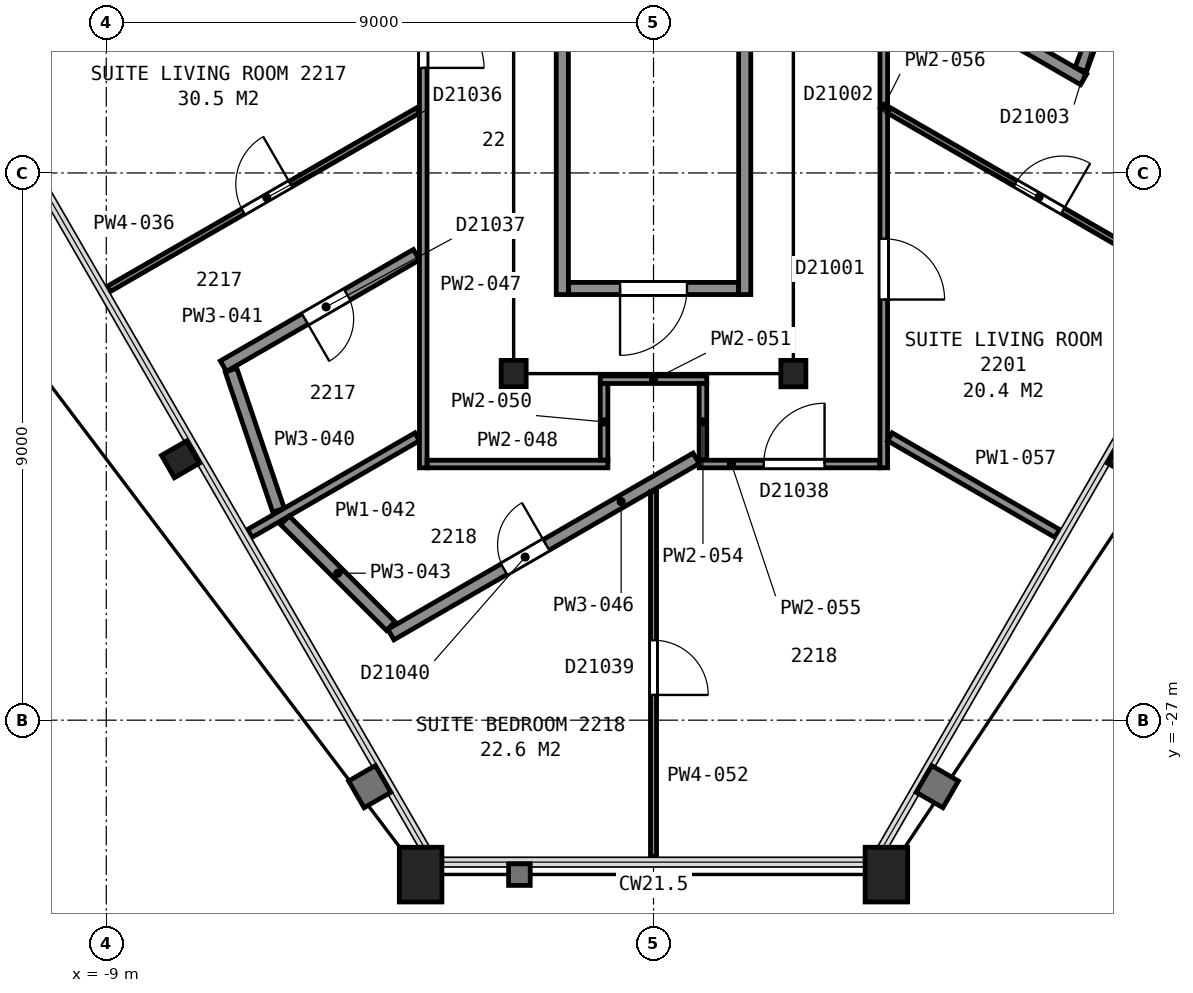
"""IFC4 building model, lengths in metres.
Left out: names, types, materials, properties, quantities, classifications, styles, units other than length and angle.
Written with IfcOpenShell. Run it as: python <this file> out.ifc"""

import sys

from ifc_helpers import new_model, si_unit, direction, frame, frame_2d, origin, origin_2d, place, context, subcontext, project, spatial, rectangle, hollow_rectangle, i_section, extrude, element, fill, save


model = new_model("IFC4")
c1 = context("Model", 3, precision=1e-05, world=origin(), true_north=direction((0.0, 1.0)))
c2 = subcontext(c1, "Body", "Model", "MODEL_VIEW")
j1 = project(units=[si_unit("LENGTHUNIT", "METRE"), si_unit("PLANEANGLEUNIT", "RADIAN")], contexts=[c1])
p1 = place(None, origin())
s1 = spatial("IfcSite", under=j1, at=p1, CompositionType="ELEMENT")
p2 = place(p1, origin())
s2 = spatial("IfcBuilding", under=s1, at=p2, CompositionType="ELEMENT")
p3 = place(p2, frame((0.0, 0.0, 96.4)))
s3 = spatial("IfcBuildingStorey", under=s2, at=p3, CompositionType="ELEMENT", Elevation=96.4)
p4 = place(p3, frame((-7.78, -22.71, 0.0), z_axis=(0.0, 0.0, 1.0), x_axis=(-0.5, 0.866025403784, 0.0)))
e1 = element("IfcColumn", 1, at=p4, inside=s3, PredefinedType="COLUMN", context=c2, shape_type="SweptSolid", body=[
    extrude(i_section(OverallWidth=0.424, OverallDepth=0.475, WebThickness=0.048, FlangeThickness=0.077, FilletRadius=0.015, at=origin_2d()), origin(), (0.0, 0.0, 1.0), 3.555),
])
for number, where, z_axis, x_axis in (
    (2, (-3.83, -29.54, 0.0), (0.0, 0.0, 1.0), (-1.0, 0.0, 0.0)),
    (3, (3.83, -29.54, 0.0), (0.0, 0.0, 1.0), (-1.0, 0.0, 0.0)),
):
    element("IfcColumn", number, at=place(p3, frame(where, z_axis=z_axis, x_axis=x_axis)), inside=s3, PredefinedType="COLUMN", context=c2, shape_type="SweptSolid", body=[
        extrude(hollow_rectangle(XDim=0.7, YDim=0.9, WallThickness=0.065, at=origin_2d()), origin(), (0.0, 0.0, 1.0), 3.525),
    ])
p5 = place(p3, frame((7.78, -22.71, 0.0), z_axis=(0.0, 0.0, 1.0), x_axis=(-0.5, -0.866025403784, 0.0)))
e4 = element("IfcColumn", 4, at=p5, inside=s3, PredefinedType="COLUMN", context=c2, shape_type="SweptSolid", body=[
    extrude(i_section(OverallWidth=0.424, OverallDepth=0.475, WebThickness=0.048, FlangeThickness=0.077, FilletRadius=0.015, at=origin_2d()), origin(), (0.0, 0.0, 1.0), 3.555),
])
for number, where, z_axis, x_axis in (
    (5, (-2.3, -21.3, 0.0), (0.0, 0.0, 1.0), (-1.0, 0.0, 0.0)),
    (6, (2.3, -21.3, 0.0), (0.0, 0.0, 1.0), (-1.0, 0.0, 0.0)),
):
    element("IfcColumn", number, at=place(p3, frame(where, z_axis=z_axis, x_axis=x_axis)), inside=s3, PredefinedType="COLUMN", context=c2, shape_type="SweptSolid", body=[
        extrude(i_section(OverallWidth=0.411, OverallDepth=0.434, WebThickness=0.036, FlangeThickness=0.057, FilletRadius=0.015, at=origin_2d()), origin(), (0.0, 0.0, 1.0), 3.6),
    ])
p6 = place(p3, frame((-1.4, -19.9, 0.0), z_axis=(0.0, 0.0, 1.0), x_axis=(1.0, 0.0, 0.0)))
e7 = element("IfcWall", 7, at=p6, inside=s3, PredefinedType="PARTITIONING", context=c2, shape_type="SweptSolid", body=[
    extrude(rectangle(XDim=2.8, YDim=0.2, at=frame_2d((1.4, 0.0))), origin(), (0.0, 0.0, 1.0), 3.35),
])
p7 = place(p6, frame((0.85, 0.0, 0.0)))
e8 = element("IfcOpeningElement", 8, at=p7, cuts=e7, PredefinedType="OPENING", context=c2, shape_type="SweptSolid", body=[
    extrude(rectangle(XDim=1.1, YDim=2.1, at=frame_2d((0.55, 1.05))), frame((0.0, 0.11, 0.0), z_axis=(0.0, -1.0, 0.0), x_axis=(1.0, 0.0, 0.0)), (0.0, 0.0, 1.0), 0.22),
])
for number, where, z_axis, x_axis in (
    (9, (1.5, -8.0, 0.0), (0.0, 0.0, 1.0), (0.0, -1.0, 0.0)),
    (10, (-1.5, -8.0, 0.0), (0.0, 0.0, 1.0), (0.0, -1.0, 0.0)),
):
    element("IfcWall", number, at=place(p3, frame(where, z_axis=z_axis, x_axis=x_axis)), inside=s3, PredefinedType="PARTITIONING", context=c2, shape_type="SweptSolid", body=[
        extrude(rectangle(XDim=12.0, YDim=0.2, at=frame_2d((6.0, 0.0))), origin(), (0.0, 0.0, 1.0), 3.35),
    ])
p8 = place(p3, frame((-3.875, -16.972, 0.0), z_axis=(0.0, 0.0, 1.0), x_axis=(-0.86602429061, -0.500001928069, 0.0)))
e11 = element("IfcWall", 11, at=p8, inside=s3, PredefinedType="PARTITIONING", context=c2, shape_type="SweptSolid", body=[
    extrude(rectangle(XDim=5.873, YDim=0.1, at=frame_2d((2.937, 0.0))), origin(), (0.0, 0.0, 1.0), 2.613),
])
p9 = place(p8, frame((2.419, 0.0, 0.0)))
e12 = element("IfcOpeningElement", 12, at=p9, cuts=e11, PredefinedType="OPENING", context=c2, shape_type="SweptSolid", body=[
    extrude(rectangle(XDim=0.9, YDim=2.1, at=frame_2d((0.45, 1.05))), frame((0.0, 0.06, 0.0), z_axis=(0.0, -1.0, 0.0), x_axis=(1.0, 0.0, 0.0)), (0.0, 0.0, 1.0), 0.12),
])
p10 = place(p3, frame((-6.948, -21.242, 0.0), z_axis=(0.0, 0.0, 1.0), x_axis=(0.321098754357, -0.947045716927, 0.0)))
e13 = element("IfcWall", 13, at=p10, inside=s3, PredefinedType="PARTITIONING", context=c2, shape_type="SweptSolid", body=[
    extrude(rectangle(XDim=2.434, YDim=0.2, at=frame_2d((1.217, 0.0))), origin(), (0.0, 0.0, 1.0), 2.613),
])
p11 = place(p3, frame((-3.899, -19.345, 0.0), z_axis=(0.0, 0.0, 1.0), x_axis=(-0.865971488458, -0.500093372459, 0.0)))
e14 = element("IfcWall", 14, at=p11, inside=s3, PredefinedType="PARTITIONING", context=c2, shape_type="SweptSolid", body=[
    extrude(rectangle(XDim=3.665, YDim=0.2, at=frame_2d((1.833, 0.0))), origin(), (0.0, 0.0, 1.0), 2.613),
])
p12 = place(p11, frame((1.315, 0.0, 0.0)))
e15 = element("IfcOpeningElement", 15, at=p12, cuts=e14, PredefinedType="OPENING", context=c2, shape_type="SweptSolid", body=[
    extrude(rectangle(XDim=0.8, YDim=2.1, at=frame_2d((0.4, 1.05))), frame((0.0, 0.11, 0.0), z_axis=(0.0, -1.0, 0.0), x_axis=(1.0, 0.0, 0.0)), (0.0, 0.0, 1.0), 0.22),
])
p13 = place(p3, frame((-6.64, -23.929, 0.0), z_axis=(0.0, 0.0, 1.0), x_axis=(0.866065365018, 0.499930778725, 0.0)))
e16 = element("IfcWall", 16, at=p13, inside=s3, PredefinedType="PARTITIONING", context=c2, shape_type="SweptSolid", body=[
    extrude(rectangle(XDim=3.179, YDim=0.15, at=frame_2d((1.589, 0.0))), origin(), (0.0, 0.0, 1.0), 2.613),
])
p14 = place(p3, frame((-6.062, -23.712, 0.0), z_axis=(0.0, 0.0, 1.0), x_axis=(0.706958057502, -0.707255473597, 0.0)))
e17 = element("IfcWall", 17, at=p14, inside=s3, PredefinedType="PARTITIONING", context=c2, shape_type="SweptSolid", body=[
    extrude(rectangle(XDim=2.463, YDim=0.2, at=frame_2d((1.231, 0.0))), origin(), (0.0, 0.0, 1.0), 2.613),
])
p15 = place(p3, frame((-4.32, -25.592, 0.0), z_axis=(0.0, 0.0, 1.0), x_axis=(0.86603408909, 0.499984956307, 0.0)))
e18 = element("IfcWall", 18, at=p15, inside=s3, PredefinedType="PARTITIONING", context=c2, shape_type="SweptSolid", body=[
    extrude(rectangle(XDim=5.797, YDim=0.2, at=frame_2d((2.898, 0.0))), origin(), (0.0, 0.0, 1.0), 2.613),
])
p16 = place(p15, frame((2.15, 0.0, 0.0)))
e19 = element("IfcOpeningElement", 19, at=p16, cuts=e18, PredefinedType="OPENING", context=c2, shape_type="SweptSolid", body=[
    extrude(rectangle(XDim=0.8, YDim=2.1, at=frame_2d((0.4, 1.05))), frame((0.0, 0.11, 0.0), z_axis=(0.0, -1.0, 0.0), x_axis=(1.0, 0.0, 0.0)), (0.0, 0.0, 1.0), 0.22),
])
p17 = place(p3, frame((-3.787, -22.85, 0.0), z_axis=(0.0, 0.0, 1.0), x_axis=(0.0, 1.0, 0.0)))
e20 = element("IfcWall", 20, at=p17, inside=s3, PredefinedType="PARTITIONING", context=c2, shape_type="SweptSolid", body=[
    extrude(rectangle(XDim=8.125, YDim=0.125, at=frame_2d((4.062, 0.0))), origin(), (0.0, 0.0, 1.0), 2.613),
])
p18 = place(p17, frame((6.577, 0.0, 0.0)))
e21 = element("IfcOpeningElement", 21, at=p18, cuts=e20, PredefinedType="OPENING", context=c2, shape_type="SweptSolid", body=[
    extrude(rectangle(XDim=1.0, YDim=2.1, at=frame_2d((0.5, 1.05))), frame((0.0, 0.073, 0.0), z_axis=(0.0, -1.0, 0.0), x_axis=(1.0, 0.0, 0.0)), (0.0, 0.0, 1.0), 0.145),
])
p19 = place(p3, frame((-3.722, -22.787, 0.0), z_axis=(0.0, 0.0, 1.0), x_axis=(1.0, 0.0, 0.0)))
e22 = element("IfcWall", 22, at=p19, inside=s3, PredefinedType="PARTITIONING", context=c2, shape_type="SweptSolid", body=[
    extrude(rectangle(XDim=2.971, YDim=0.125, at=frame_2d((1.486, 0.0))), origin(), (0.0, 0.0, 1.0), 2.613),
])
p20 = place(p3, frame((-0.813, -22.722, 0.0), z_axis=(0.0, 0.0, 1.0), x_axis=(0.0, 1.0, 0.0)))
e23 = element("IfcWall", 23, at=p20, inside=s3, PredefinedType="PARTITIONING", context=c2, shape_type="SweptSolid", body=[
    extrude(rectangle(XDim=1.257, YDim=0.125, at=frame_2d((0.628, 0.0))), origin(), (0.0, 0.0, 1.0), 2.613),
])
p21 = place(p3, frame((-0.875, -21.4, 0.0), z_axis=(0.0, 0.0, 1.0), x_axis=(1.0, 0.0, 0.0)))
e24 = element("IfcWall", 24, at=p21, inside=s3, PredefinedType="PARTITIONING", context=c2, shape_type="SweptSolid", body=[
    extrude(rectangle(XDim=1.751, YDim=0.125, at=frame_2d((0.875, 0.0))), origin(), (0.0, 0.0, 1.0), 2.613),
])
p22 = place(p3, frame((0.0, -29.239, 0.0), z_axis=(0.0, 0.0, 1.0), x_axis=(0.0, 1.0, 0.0)))
e25 = element("IfcWall", 25, at=p22, inside=s3, PredefinedType="PARTITIONING", context=c2, shape_type="SweptSolid", body=[
    extrude(rectangle(XDim=5.997, YDim=0.1, at=frame_2d((2.998, 0.0))), origin(), (0.0, 0.0, 1.0), 2.613),
])
p23 = place(p22, frame((2.654, 0.0, 0.0)))
e26 = element("IfcOpeningElement", 26, at=p23, cuts=e25, PredefinedType="OPENING", context=c2, shape_type="SweptSolid", body=[
    extrude(rectangle(XDim=0.9, YDim=2.1, at=frame_2d((0.45, 1.05))), frame((0.0, 0.06, 0.0), z_axis=(0.0, -1.0, 0.0), x_axis=(1.0, 0.0, 0.0)), (0.0, 0.0, 1.0), 0.12),
])
p24 = place(p3, frame((0.813, -22.722, 0.0), z_axis=(0.0, 0.0, 1.0), x_axis=(0.0, 1.0, 0.0)))
e27 = element("IfcWall", 27, at=p24, inside=s3, PredefinedType="PARTITIONING", context=c2, shape_type="SweptSolid", body=[
    extrude(rectangle(XDim=1.257, YDim=0.125, at=frame_2d((0.628, 0.0))), origin(), (0.0, 0.0, 1.0), 2.613),
])
p25 = place(p3, frame((3.722, -22.787, 0.0), z_axis=(0.0, 0.0, 1.0), x_axis=(-1.0, 0.0, 0.0)))
e28 = element("IfcWall", 28, at=p25, inside=s3, PredefinedType="PARTITIONING", context=c2, shape_type="SweptSolid", body=[
    extrude(rectangle(XDim=2.971, YDim=0.125, at=frame_2d((1.486, 0.0))), origin(), (0.0, 0.0, 1.0), 2.613),
])
p26 = place(p25, frame((0.909, 0.0, 0.0)))
e29 = element("IfcOpeningElement", 29, at=p26, cuts=e28, PredefinedType="OPENING", context=c2, shape_type="SweptSolid", body=[
    extrude(rectangle(XDim=1.0, YDim=2.1, at=frame_2d((0.5, 1.05))), frame((0.0, 0.073, 0.0), z_axis=(0.0, -1.0, 0.0), x_axis=(1.0, 0.0, 0.0)), (0.0, 0.0, 1.0), 0.145),
])
p27 = place(p3, frame((3.787, -14.725, 0.0), z_axis=(0.0, 0.0, 1.0), x_axis=(0.0, -1.0, 0.0)))
e30 = element("IfcWall", 30, at=p27, inside=s3, PredefinedType="PARTITIONING", context=c2, shape_type="SweptSolid", body=[
    extrude(rectangle(XDim=8.125, YDim=0.125, at=frame_2d((4.062, 0.0))), origin(), (0.0, 0.0, 1.0), 2.613),
])
p28 = place(p27, frame((4.357, 0.0, 0.0)))
e31 = element("IfcOpeningElement", 31, at=p28, cuts=e30, PredefinedType="OPENING", context=c2, shape_type="SweptSolid", body=[
    extrude(rectangle(XDim=1.0, YDim=2.1, at=frame_2d((0.5, 1.05))), frame((0.0, 0.073, 0.0), z_axis=(0.0, -1.0, 0.0), x_axis=(1.0, 0.0, 0.0)), (0.0, 0.0, 1.0), 0.145),
])
p29 = place(p3, frame((3.887, -22.34, 0.0), z_axis=(0.0, 0.0, 1.0), x_axis=(0.866065365018, -0.499930778725, 0.0)))
e32 = element("IfcWall", 32, at=p29, inside=s3, PredefinedType="PARTITIONING", context=c2, shape_type="SweptSolid", body=[
    extrude(rectangle(XDim=3.179, YDim=0.15, at=frame_2d((1.589, 0.0))), origin(), (0.0, 0.0, 1.0), 2.613),
])
p30 = place(p3, frame((3.875, -16.972, 0.0), z_axis=(0.0, 0.0, 1.0), x_axis=(0.86602429061, -0.500001928069, 0.0)))
e33 = element("IfcWall", 33, at=p30, inside=s3, PredefinedType="PARTITIONING", context=c2, shape_type="SweptSolid", body=[
    extrude(rectangle(XDim=5.873, YDim=0.1, at=frame_2d((2.937, 0.0))), origin(), (0.0, 0.0, 1.0), 2.613),
])
p31 = place(p30, frame((2.399, 0.0, 0.0)))
e34 = element("IfcOpeningElement", 34, at=p31, cuts=e33, PredefinedType="OPENING", context=c2, shape_type="SweptSolid", body=[
    extrude(rectangle(XDim=0.9, YDim=2.1, at=frame_2d((0.45, 1.05))), frame((0.0, 0.06, 0.0), z_axis=(0.0, -1.0, 0.0), x_axis=(1.0, 0.0, 0.0)), (0.0, 0.0, 1.0), 0.12),
])
p32 = place(p3, frame((3.875, -14.613, 0.0), z_axis=(0.0, 0.0, 1.0), x_axis=(0.865890522866, -0.500233547866, 0.0)))
e35 = element("IfcWall", 35, at=p32, inside=s3, PredefinedType="PARTITIONING", context=c2, shape_type="SweptSolid", body=[
    extrude(rectangle(XDim=3.694, YDim=0.2, at=frame_2d((1.847, 0.0))), origin(), (0.0, 0.0, 1.0), 2.613),
])
p33 = place(p3, frame((7.028, -16.298, 0.0), z_axis=(0.0, 0.0, 1.0), x_axis=(0.342817359533, 0.939402074728, 0.0)))
e36 = element("IfcWall", 36, at=p33, inside=s3, PredefinedType="PARTITIONING", context=c2, shape_type="SweptSolid", body=[
    extrude(rectangle(XDim=2.426, YDim=0.2, at=frame_2d((1.213, 0.0))), origin(), (0.0, 0.0, 1.0), 2.613),
])
p34 = place(p33, frame((0.78, 0.0, 0.0)))
e37 = element("IfcOpeningElement", 37, at=p34, cuts=e36, PredefinedType="OPENING", context=c2, shape_type="SweptSolid", body=[
    extrude(rectangle(XDim=0.8, YDim=2.1, at=frame_2d((0.4, 1.05))), frame((0.0, 0.11, 0.0), z_axis=(0.0, -1.0, 0.0), x_axis=(1.0, 0.0, 0.0)), (0.0, 0.0, 1.0), 0.22),
])
p35 = place(p7, origin())
e38 = element("IfcDoor", 38, at=p35, inside=s3, OperationType="SINGLE_SWING_LEFT", PredefinedType="DOOR", context=c2, shape_type="SweptSolid", body=[
    extrude(rectangle(XDim=1.1, YDim=2.1, at=frame_2d((0.55, 1.05))), frame((0.0, 0.025, 0.0), z_axis=(0.0, -1.0, 0.0), x_axis=(1.0, 0.0, 0.0)), (0.0, 0.0, 1.0), 0.05),
])
fill(e8, e38)
p36 = place(p9, origin())
e39 = element("IfcDoor", 39, at=p36, inside=s3, OperationType="SINGLE_SWING_LEFT", PredefinedType="DOOR", context=c2, shape_type="SweptSolid", body=[
    extrude(rectangle(XDim=0.9, YDim=2.1, at=frame_2d((0.45, 1.05))), frame((0.0, 0.025, 0.0), z_axis=(0.0, -1.0, 0.0), x_axis=(1.0, 0.0, 0.0)), (0.0, 0.0, 1.0), 0.05),
])
fill(e12, e39)
p37 = place(p12, origin())
e40 = element("IfcDoor", 40, at=p37, inside=s3, OperationType="SINGLE_SWING_RIGHT", PredefinedType="DOOR", context=c2, shape_type="SweptSolid", body=[
    extrude(rectangle(XDim=0.8, YDim=2.1, at=frame_2d((0.4, 1.05))), frame((0.0, 0.025, 0.0), z_axis=(0.0, -1.0, 0.0), x_axis=(1.0, 0.0, 0.0)), (0.0, 0.0, 1.0), 0.05),
])
fill(e15, e40)
p38 = place(p16, origin())
e41 = element("IfcDoor", 41, at=p38, inside=s3, OperationType="SINGLE_SWING_RIGHT", PredefinedType="DOOR", context=c2, shape_type="SweptSolid", body=[
    extrude(rectangle(XDim=0.8, YDim=2.1, at=frame_2d((0.4, 1.05))), frame((0.0, 0.025, 0.0), z_axis=(0.0, -1.0, 0.0), x_axis=(1.0, 0.0, 0.0)), (0.0, 0.0, 1.0), 0.05),
])
fill(e19, e41)
p39 = place(p18, origin())
e42 = element("IfcDoor", 42, at=p39, inside=s3, OperationType="SINGLE_SWING_LEFT", PredefinedType="DOOR", context=c2, shape_type="SweptSolid", body=[
    extrude(rectangle(XDim=1.0, YDim=2.1, at=frame_2d((0.5, 1.05))), frame((0.0, 0.025, 0.0), z_axis=(0.0, -1.0, 0.0), x_axis=(1.0, 0.0, 0.0)), (0.0, 0.0, 1.0), 0.05),
])
fill(e21, e42)
p40 = place(p23, origin())
e43 = element("IfcDoor", 43, at=p40, inside=s3, OperationType="SINGLE_SWING_LEFT", PredefinedType="DOOR", context=c2, shape_type="SweptSolid", body=[
    extrude(rectangle(XDim=0.9, YDim=2.1, at=frame_2d((0.45, 1.05))), frame((0.0, 0.025, 0.0), z_axis=(0.0, -1.0, 0.0), x_axis=(1.0, 0.0, 0.0)), (0.0, 0.0, 1.0), 0.05),
])
fill(e26, e43)
p41 = place(p26, origin())
e44 = element("IfcDoor", 44, at=p41, inside=s3, OperationType="SINGLE_SWING_LEFT", PredefinedType="DOOR", context=c2, shape_type="SweptSolid", body=[
    extrude(rectangle(XDim=1.0, YDim=2.1, at=frame_2d((0.5, 1.05))), frame((0.0, 0.025, 0.0), z_axis=(0.0, -1.0, 0.0), x_axis=(1.0, 0.0, 0.0)), (0.0, 0.0, 1.0), 0.05),
])
fill(e29, e44)
p42 = place(p28, origin())
e45 = element("IfcDoor", 45, at=p42, inside=s3, OperationType="SINGLE_SWING_RIGHT", PredefinedType="DOOR", context=c2, shape_type="SweptSolid", body=[
    extrude(rectangle(XDim=1.0, YDim=2.1, at=frame_2d((0.5, 1.05))), frame((0.0, 0.025, 0.0), z_axis=(0.0, -1.0, 0.0), x_axis=(1.0, 0.0, 0.0)), (0.0, 0.0, 1.0), 0.05),
])
fill(e31, e45)
p43 = place(p31, origin())
e46 = element("IfcDoor", 46, at=p43, inside=s3, OperationType="SINGLE_SWING_RIGHT", PredefinedType="DOOR", context=c2, shape_type="SweptSolid", body=[
    extrude(rectangle(XDim=0.9, YDim=2.1, at=frame_2d((0.45, 1.05))), frame((0.0, 0.025, 0.0), z_axis=(0.0, -1.0, 0.0), x_axis=(1.0, 0.0, 0.0)), (0.0, 0.0, 1.0), 0.05),
])
fill(e34, e46)
save(model, sys.argv[1])
